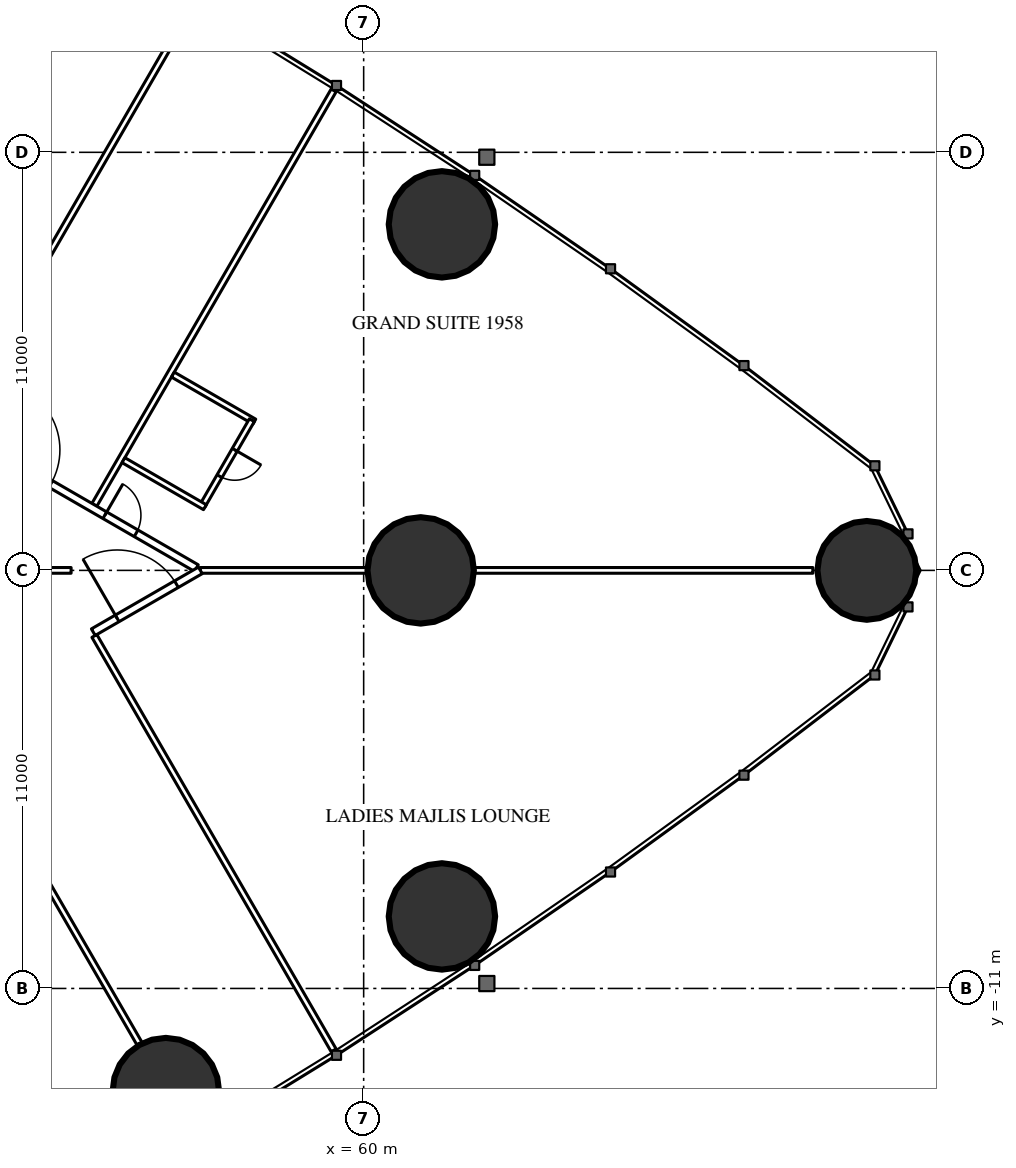
"""IFC4 building model, lengths in metres.
Left out: names, types, materials, properties, quantities, classifications, styles, units other than length and angle.
Written with IfcOpenShell. Run it as: python <this file> out.ifc"""

import sys

from ifc_helpers import new_model, si_unit, direction, frame, frame_2d, origin, origin_2d, place, context, subcontext, project, spatial, rectangle, hollow_circle, extrude, element, fill, save


model = new_model("IFC4")
c1 = context("Model", 3, precision=1e-05, world=origin(), true_north=direction((0.0, 1.0)))
c2 = subcontext(c1, "Body", "Model", "MODEL_VIEW")
j1 = project(units=[si_unit("LENGTHUNIT", "METRE"), si_unit("PLANEANGLEUNIT", "RADIAN")], contexts=[c1])
p1 = place(None, origin())
s1 = spatial("IfcSite", under=j1, at=p1, CompositionType="ELEMENT")
p2 = place(p1, origin())
s2 = spatial("IfcBuilding", under=s1, at=p2, CompositionType="ELEMENT")
p3 = place(p2, frame((0.0, 0.0, 74.0)))
s3 = spatial("IfcBuildingStorey", under=s2, at=p3, CompositionType="ELEMENT", Elevation=74.0)
p4 = place(p3, frame((73.239, 0.0, 0.0), z_axis=(0.0, 0.0, 1.0), x_axis=(1.0, 0.0, 0.0)))
e1 = element("IfcColumn", 1, at=p4, inside=s3, PredefinedType="COLUMN", context=c2, shape_type="SweptSolid", body=[
    extrude(hollow_circle(Radius=1.3, WallThickness=0.1, at=origin_2d()), origin(), (0.0, 0.0, 1.0), 3.5),
])
for number, where, z_axis, x_axis in (
    (2, (62.059, 9.105, 0.0), (0.0, 0.0, 1.0), (1.0, 0.0, 0.0)),
    (3, (54.795, -13.701, 0.0), (0.0, 0.0, 1.0), (1.0, 0.0, 0.0)),
    (4, (62.059, -9.105, 0.0), (0.0, 0.0, 1.0), (1.0, 0.0, 0.0)),
):
    element("IfcColumn", number, at=place(p3, frame(where, z_axis=z_axis, x_axis=x_axis)), inside=s3, PredefinedType="COLUMN", context=c2, shape_type="SweptSolid", body=[
        extrude(hollow_circle(Radius=1.4, WallThickness=0.12, at=origin_2d()), origin(), (0.0, 0.0, 1.0), 3.5),
    ])
p5 = place(p3, frame((61.5, 0.0, 0.0), z_axis=(0.0, 0.0, 1.0), x_axis=(1.0, 0.0, 0.0)))
e5 = element("IfcColumn", 5, at=p5, inside=s3, PredefinedType="COLUMN", context=c2, shape_type="SweptSolid", body=[
    extrude(hollow_circle(Radius=1.4, WallThickness=0.1, at=origin_2d()), origin(), (0.0, 0.0, 1.0), 3.5),
])
p6 = place(p3, frame((49.159, -3.893, 0.0), z_axis=(0.0, 0.0, 1.0), x_axis=(0.499998773722, -0.866026111775, 0.0)))
e6 = element("IfcWall", 6, at=p6, inside=s3, PredefinedType="PARTITIONING", context=c2, shape_type="SweptSolid", body=[
    extrude(rectangle(XDim=9.892, YDim=0.15, at=frame_2d((4.946, 0.0))), origin(), (0.0, 0.0, 1.0), 2.25),
])
p7 = place(p3, frame((52.915, -1.725, 0.0), z_axis=(0.0, 0.0, 1.0), x_axis=(0.499997163113, -0.866027041656, 0.0)))
e7 = element("IfcWall", 7, at=p7, inside=s3, PredefinedType="PARTITIONING", context=c2, shape_type="SweptSolid", body=[
    extrude(rectangle(XDim=12.591, YDim=0.15, at=frame_2d((6.295, 0.0))), origin(), (0.0, 0.0, 1.0), 3.25),
])
p8 = place(p3, frame((49.159, 3.893, 0.0), z_axis=(0.0, 0.0, 1.0), x_axis=(0.499995664361, 0.866027906952, 0.0)))
e8 = element("IfcWall", 8, at=p8, inside=s3, PredefinedType="PARTITIONING", context=c2, shape_type="SweptSolid", body=[
    extrude(rectangle(XDim=12.711, YDim=0.15, at=frame_2d((6.356, 0.0))), origin(), (0.0, 0.0, 1.0), 3.25),
])
p9 = place(p3, frame((52.915, 1.725, 0.0), z_axis=(0.0, 0.0, 1.0), x_axis=(0.499997163113, 0.866027041656, 0.0)))
e9 = element("IfcWall", 9, at=p9, inside=s3, PredefinedType="PARTITIONING", context=c2, shape_type="SweptSolid", body=[
    extrude(rectangle(XDim=12.591, YDim=0.15, at=frame_2d((6.295, 0.0))), origin(), (0.0, 0.0, 1.0), 3.25),
])
p10 = place(p3, frame((55.702, 0.0, 0.0), z_axis=(0.0, 0.0, 1.0), x_axis=(1.0, 0.0, 0.0)))
e10 = element("IfcWall", 10, at=p10, inside=s3, PredefinedType="PARTITIONING", context=c2, shape_type="SweptSolid", body=[
    extrude(rectangle(XDim=16.117, YDim=0.15, at=frame_2d((8.059, 0.0))), origin(), (0.0, 0.0, 1.0), 2.25),
])
p11 = place(p3, frame((36.834, 10.894, 0.0), z_axis=(0.0, 0.0, 1.0), x_axis=(0.866028157229, -0.499995230863, 0.0)))
e11 = element("IfcWall", 11, at=p11, inside=s3, PredefinedType="PARTITIONING", context=c2, shape_type="SweptSolid", body=[
    extrude(rectangle(XDim=21.667, YDim=0.2, at=frame_2d((10.833, 0.0))), origin(), (0.0, 0.0, 1.0), 3.25),
])
p12 = place(p11, frame((18.885, 0.0, 0.0)))
e12 = element("IfcOpeningElement", 12, at=p12, cuts=e11, PredefinedType="OPENING", context=c2, shape_type="SweptSolid", body=[
    extrude(rectangle(XDim=0.95, YDim=2.2, at=frame_2d((0.475, 1.1))), frame((0.0, 0.11, 0.0), z_axis=(0.0, -1.0, 0.0), x_axis=(1.0, 0.0, 0.0)), (0.0, 0.0, 1.0), 0.22),
])
p13 = place(p11, frame((15.443, 0.0, 0.0)))
e13 = element("IfcOpeningElement", 13, at=p13, cuts=e11, PredefinedType="OPENING", context=c2, shape_type="SweptSolid", body=[
    extrude(rectangle(XDim=1.8, YDim=2.2, at=frame_2d((0.9, 1.1))), frame((0.0, 0.11, 0.0), z_axis=(0.0, -1.0, 0.0), x_axis=(1.0, 0.0, 0.0)), (0.0, 0.0, 1.0), 0.22),
])
p14 = place(p11, frame((12.562, 0.0, 0.0)))
e14 = element("IfcOpeningElement", 14, at=p14, cuts=e11, PredefinedType="OPENING", context=c2, shape_type="SweptSolid", body=[
    extrude(rectangle(XDim=0.95, YDim=2.2, at=frame_2d((0.475, 1.1))), frame((0.0, 0.11, 0.0), z_axis=(0.0, -1.0, 0.0), x_axis=(1.0, 0.0, 0.0)), (0.0, 0.0, 1.0), 0.22),
])
p15 = place(p11, frame((4.292, 0.0, 0.0)))
e15 = element("IfcOpeningElement", 15, at=p15, cuts=e11, PredefinedType="OPENING", context=c2, shape_type="SweptSolid", body=[
    extrude(rectangle(XDim=1.0, YDim=2.2, at=frame_2d((0.5, 1.1))), frame((0.0, 0.11, 0.0), z_axis=(0.0, -1.0, 0.0), x_axis=(1.0, 0.0, 0.0)), (0.0, 0.0, 1.0), 0.22),
])
p16 = place(p3, frame((52.886, -1.626, 0.0), z_axis=(0.0, 0.0, 1.0), x_axis=(0.866030540913, 0.499991102127, 0.0)))
e16 = element("IfcWall", 16, at=p16, inside=s3, PredefinedType="PARTITIONING", context=c2, shape_type="SweptSolid", body=[
    extrude(rectangle(XDim=3.251, YDim=0.2, at=frame_2d((1.626, 0.0))), origin(), (0.0, 0.0, 1.0), 3.25),
])
p17 = place(p16, frame((0.726, 0.0, 0.0)))
e17 = element("IfcOpeningElement", 17, at=p17, cuts=e16, PredefinedType="OPENING", context=c2, shape_type="SweptSolid", body=[
    extrude(rectangle(XDim=1.8, YDim=2.2, at=frame_2d((0.9, 1.1))), frame((0.0, 0.11, 0.0), z_axis=(0.0, -1.0, 0.0), x_axis=(1.0, 0.0, 0.0)), (0.0, 0.0, 1.0), 0.22),
])
p18 = place(p3, frame((54.98, 5.151, 0.0), z_axis=(0.0, 0.0, 1.0), x_axis=(0.86604923931, -0.499958713387, 0.0)))
e18 = element("IfcWall", 18, at=p18, inside=s3, PredefinedType="PARTITIONING", context=c2, shape_type="SweptSolid", body=[
    extrude(rectangle(XDim=2.475, YDim=0.15, at=frame_2d((1.237, 0.0))), origin(), (0.0, 0.0, 1.0), 3.25),
])
p19 = place(p3, frame((55.758, 1.7, 0.0), z_axis=(0.0, 0.0, 1.0), x_axis=(0.500006934395, 0.866021400173, 0.0)))
e19 = element("IfcWall", 19, at=p19, inside=s3, PredefinedType="PARTITIONING", context=c2, shape_type="SweptSolid", body=[
    extrude(rectangle(XDim=2.6, YDim=0.15, at=frame_2d((1.3, 0.0))), origin(), (0.0, 0.0, 1.0), 3.25),
])
p20 = place(p19, frame((0.9, 0.0, 0.0)))
e20 = element("IfcOpeningElement", 20, at=p20, cuts=e19, PredefinedType="OPENING", context=c2, shape_type="SweptSolid", body=[
    extrude(rectangle(XDim=0.8, YDim=2.2, at=frame_2d((0.4, 1.1))), frame((0.0, 0.085, 0.0), z_axis=(0.0, -1.0, 0.0), x_axis=(1.0, 0.0, 0.0)), (0.0, 0.0, 1.0), 0.17),
])
p21 = place(p3, frame((53.68, 2.9, 0.0), z_axis=(0.0, 0.0, 1.0), x_axis=(0.866006523861, -0.500032699561, 0.0)))
e21 = element("IfcWall", 21, at=p21, inside=s3, PredefinedType="PARTITIONING", context=c2, shape_type="SweptSolid", body=[
    extrude(rectangle(XDim=2.475, YDim=0.15, at=frame_2d((1.237, 0.0))), origin(), (0.0, 0.0, 1.0), 3.25),
])
p22 = place(p3, frame((44.575, 0.0, 0.0), z_axis=(0.0, 0.0, 1.0), x_axis=(1.0, 0.0, 0.0)))
e22 = element("IfcWall", 22, at=p22, inside=s3, PredefinedType="PARTITIONING", context=c2, shape_type="SweptSolid", body=[
    extrude(rectangle(XDim=7.727, YDim=0.15, at=frame_2d((3.864, 0.0))), origin(), (0.0, 0.0, 1.0), 2.25),
])
p23 = place(p17, origin())
e23 = element("IfcDoor", 23, at=p23, inside=s3, OperationType="DOUBLE_DOOR_SINGLE_SWING", PredefinedType="DOOR", context=c2, shape_type="SweptSolid", body=[
    extrude(rectangle(XDim=1.8, YDim=2.2, at=frame_2d((0.9, 1.1))), frame((0.0, 0.025, 0.0), z_axis=(0.0, -1.0, 0.0), x_axis=(1.0, 0.0, 0.0)), (0.0, 0.0, 1.0), 0.05),
])
fill(e17, e23)
p24 = place(p20, origin())
e24 = element("IfcDoor", 24, at=p24, inside=s3, OperationType="SINGLE_SWING_RIGHT", PredefinedType="DOOR", context=c2, shape_type="SweptSolid", body=[
    extrude(rectangle(XDim=0.8, YDim=2.2, at=frame_2d((0.4, 1.1))), frame((0.0, 0.025, 0.0), z_axis=(0.0, -1.0, 0.0), x_axis=(1.0, 0.0, 0.0)), (0.0, 0.0, 1.0), 0.05),
])
fill(e20, e24)
p25 = place(p12, origin())
e25 = element("IfcDoor", 25, at=p25, inside=s3, OperationType="SINGLE_SWING_LEFT", PredefinedType="DOOR", context=c2, shape_type="SweptSolid", body=[
    extrude(rectangle(XDim=0.95, YDim=2.2, at=frame_2d((0.475, 1.1))), frame((0.0, 0.025, 0.0), z_axis=(0.0, -1.0, 0.0), x_axis=(1.0, 0.0, 0.0)), (0.0, 0.0, 1.0), 0.05),
])
fill(e12, e25)
save(model, sys.argv[1])
